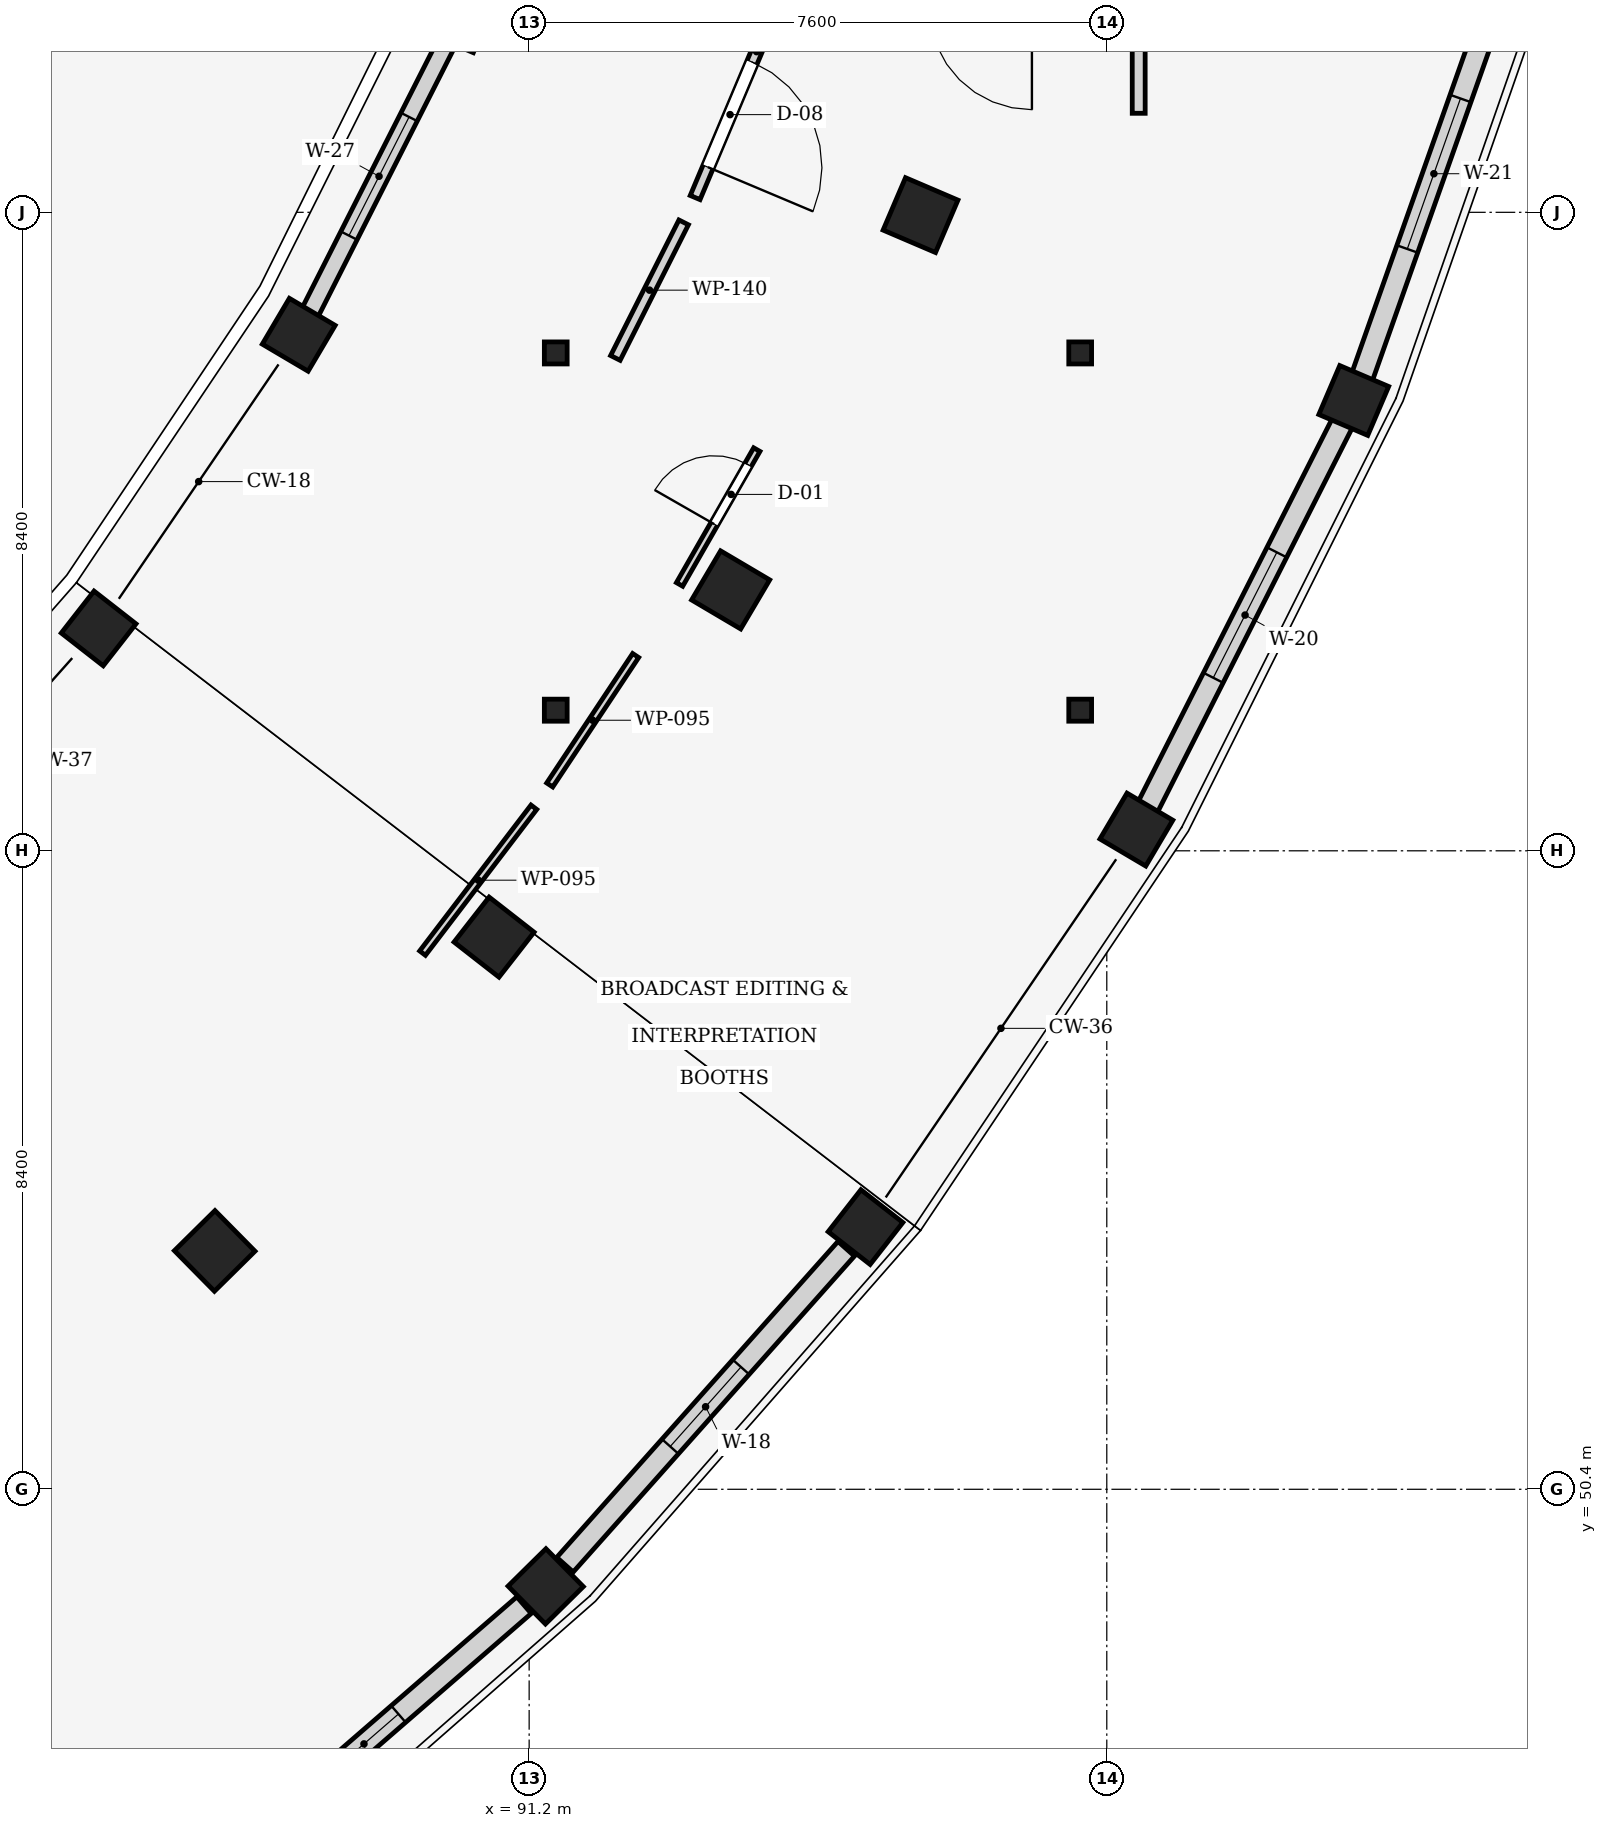
"""IFC4 building model, lengths in metres.
Left out: names, types, materials, properties, quantities, classifications, styles, units other than length and angle.
Written with IfcOpenShell. Run it as: python <this file> out.ifc"""

import sys

from ifc_helpers import new_model, si_unit, direction, frame, frame_2d, origin, origin_2d, place, context, subcontext, project, spatial, rectangle, circle, i_section, extrude, element, fill, save


model = new_model("IFC4")
c1 = context("Model", 3, precision=1e-05, world=origin(), true_north=direction((0.0, 1.0)))
c2 = subcontext(c1, "Body", "Model", "MODEL_VIEW")
j1 = project(units=[si_unit("LENGTHUNIT", "METRE"), si_unit("PLANEANGLEUNIT", "RADIAN")], contexts=[c1])
p1 = place(None, origin())
s1 = spatial("IfcSite", under=j1, at=p1, CompositionType="ELEMENT")
p2 = place(p1, origin())
s2 = spatial("IfcBuilding", under=s1, at=p2, CompositionType="ELEMENT")
p3 = place(p2, frame((0.0, 0.0, 5.1)))
s3 = spatial("IfcBuildingStorey", under=s2, at=p3, CompositionType="ELEMENT", Elevation=5.1)
p4 = place(p3, frame((87.063, 53.536, 0.0), z_axis=(0.0, 0.0, 1.0), x_axis=(0.70240155419, -0.711780904964, 0.0)))
e1 = element("IfcColumn", 1, at=p4, inside=s3, PredefinedType="COLUMN", context=c2, shape_type="SweptSolid", body=[
    extrude(circle(Radius=0.375, at=origin_2d()), origin(), (0.0, 0.0, 1.0), 4.05),
])
for number, where, z_axis, x_axis in (
    (2, (91.418, 49.123, 0.0), (0.0, 0.0, 1.0), (0.702, -0.712, 0.0)),
    (3, (85.536, 61.726, 0.0), (0.0, 0.0, 1.0), (0.788, -0.615, 0.0)),
):
    element("IfcColumn", number, at=place(p3, frame(where, z_axis=z_axis, x_axis=x_axis)), inside=s3, PredefinedType="COLUMN", context=c2, shape_type="SweptSolid", body=[
        extrude(rectangle(XDim=0.7, YDim=0.7, at=origin_2d()), origin(), (0.0, 0.0, 1.0), 4.05),
    ])
p5 = place(p3, frame((90.738, 57.664, 0.0), z_axis=(0.0, 0.0, 1.0), x_axis=(0.78822561199, -0.615386370179, 0.0)))
e4 = element("IfcColumn", 4, at=p5, inside=s3, PredefinedType="COLUMN", context=c2, shape_type="SweptSolid", body=[
    extrude(circle(Radius=0.375, at=origin_2d()), origin(), (0.0, 0.0, 1.0), 4.05),
])
for number, where, z_axis, x_axis in (
    (5, (95.626, 53.849, 0.0), (0.0, 0.0, 1.0), (0.788, -0.615, 0.0)),
    (6, (88.168, 65.589, 0.0), (0.0, 0.0, 1.0), (0.861, -0.509, 0.0)),
):
    element("IfcColumn", number, at=place(p3, frame(where, z_axis=z_axis, x_axis=x_axis)), inside=s3, PredefinedType="COLUMN", context=c2, shape_type="SweptSolid", body=[
        extrude(rectangle(XDim=0.7, YDim=0.7, at=origin_2d()), origin(), (0.0, 0.0, 1.0), 4.05),
    ])
p6 = place(p3, frame((93.851, 62.232, 0.0), z_axis=(0.0, 0.0, 1.0), x_axis=(0.861008442465, -0.508590662521, 0.0)))
e7 = element("IfcColumn", 7, at=p6, inside=s3, PredefinedType="COLUMN", context=c2, shape_type="SweptSolid", body=[
    extrude(circle(Radius=0.375, at=origin_2d()), origin(), (0.0, 0.0, 1.0), 4.05),
])
for number, where, z_axis, x_axis in (
    (8, (99.189, 59.079, 0.0), (0.0, 0.0, 1.0), (0.861, -0.509, 0.0)),
    (9, (90.281, 69.76, 0.0), (0.0, 0.0, 1.0), (0.919, -0.393, 0.0)),
):
    element("IfcColumn", number, at=place(p3, frame(where, z_axis=z_axis, x_axis=x_axis)), inside=s3, PredefinedType="COLUMN", context=c2, shape_type="SweptSolid", body=[
        extrude(rectangle(XDim=0.7, YDim=0.7, at=origin_2d()), origin(), (0.0, 0.0, 1.0), 4.05),
    ])
p7 = place(p3, frame((96.349, 67.163, 0.0), z_axis=(0.0, 0.0, 1.0), x_axis=(0.919410138581, -0.393300136124, 0.0)))
e10 = element("IfcColumn", 10, at=p7, inside=s3, PredefinedType="COLUMN", context=c2, shape_type="SweptSolid", body=[
    extrude(circle(Radius=0.375, at=origin_2d()), origin(), (0.0, 0.0, 1.0), 4.05),
])
p8 = place(p3, frame((102.049, 64.724, 0.0), z_axis=(0.0, 0.0, 1.0), x_axis=(0.919410138581, -0.393300136124, 0.0)))
e11 = element("IfcColumn", 11, at=p8, inside=s3, PredefinedType="COLUMN", context=c2, shape_type="SweptSolid", body=[
    extrude(rectangle(XDim=0.7, YDim=0.7, at=origin_2d()), origin(), (0.0, 0.0, 1.0), 4.05),
])
for number, where, z_axis, x_axis in (
    (12, (91.55, 60.65, 0.0), (0.0, 0.0, 1.0), (1.0, 0.0, 0.0)),
    (13, (98.45, 60.65, 0.0), (0.0, 0.0, 1.0), (1.0, 0.0, 0.0)),
    (14, (98.45, 65.35, 0.0), (0.0, 0.0, 1.0), (1.0, 0.0, 0.0)),
    (15, (91.55, 65.35, 0.0), (0.0, 0.0, 1.0), (1.0, 0.0, 0.0)),
):
    element("IfcColumn", number, at=place(p3, frame(where, z_axis=z_axis, x_axis=x_axis)), inside=s3, PredefinedType="COLUMN", context=c2, shape_type="SweptSolid", body=[
        extrude(i_section(OverallWidth=0.3, OverallDepth=0.29, WebThickness=0.009, FlangeThickness=0.014, at=origin_2d()), origin(), (0.0, 0.0, 1.0), 4.05),
    ])
p9 = place(p3, frame((91.133, 48.876, 0.0), z_axis=(0.0, 0.0, 1.0), x_axis=(-0.755658734158, -0.654965554431, 0.0)))
e16 = element("IfcWall", 16, at=p9, inside=s3, PredefinedType="STANDARD", context=c2, shape_type="SweptSolid", body=[
    extrude(rectangle(XDim=5.574, YDim=0.29, at=frame_2d((2.787, 0.0))), origin(), (0.0, 0.0, 1.0), 3.145),
])
p10 = place(p9, frame((2.187, 0.0, 0.85)))
e17 = element("IfcOpeningElement", 17, at=p10, cuts=e16, PredefinedType="OPENING", context=c2, shape_type="SweptSolid", body=[
    extrude(rectangle(XDim=1.2, YDim=1.65, at=frame_2d((0.6, 0.825))), frame((0.0, 0.155, 0.0), z_axis=(0.0, -1.0, 0.0), x_axis=(1.0, 0.0, 0.0)), (0.0, 0.0, 1.0), 0.31),
])
p11 = place(p3, frame((95.372, 53.564, 0.0), z_axis=(0.0, 0.0, 1.0), x_axis=(-0.664946320764, -0.746891150371, 0.0)))
e18 = element("IfcWall", 18, at=p11, inside=s3, PredefinedType="STANDARD", context=c2, shape_type="SweptSolid", body=[
    extrude(rectangle(XDim=5.565, YDim=0.29, at=frame_2d((2.783, 0.0))), origin(), (0.0, 0.0, 1.0), 3.145),
])
p12 = place(p11, frame((2.083, 0.0, 0.85)))
e19 = element("IfcOpeningElement", 19, at=p12, cuts=e18, PredefinedType="OPENING", context=c2, shape_type="SweptSolid", body=[
    extrude(rectangle(XDim=1.4, YDim=1.65, at=frame_2d((0.7, 0.825))), frame((0.0, 0.155, 0.0), z_axis=(0.0, -1.0, 0.0), x_axis=(1.0, 0.0, 0.0)), (0.0, 0.0, 1.0), 0.31),
])
p13 = place(p3, frame((101.905, 64.439, 0.0), z_axis=(0.0, 0.0, 1.0), x_axis=(-0.451927461329, -0.892054689857, 0.0)))
e20 = element("IfcWall", 20, at=p13, inside=s3, PredefinedType="STANDARD", context=c2, shape_type="SweptSolid", body=[
    extrude(rectangle(XDim=5.69, YDim=0.29, at=frame_2d((2.845, 0.0))), origin(), (0.0, 0.0, 1.0), 3.145),
])
p14 = place(p13, frame((1.92, 0.0, 0.85)))
e21 = element("IfcOpeningElement", 21, at=p14, cuts=e20, PredefinedType="OPENING", context=c2, shape_type="SweptSolid", body=[
    extrude(rectangle(XDim=1.85, YDim=1.65, at=frame_2d((0.925, 0.825))), frame((0.0, 0.155, 0.0), z_axis=(0.0, -1.0, 0.0), x_axis=(1.0, 0.0, 0.0)), (0.0, 0.0, 1.0), 0.31),
])
p15 = place(p3, frame((88.313, 65.874, 0.0), z_axis=(0.0, 0.0, 1.0), x_axis=(0.451901258468, 0.892067964112, 0.0)))
e22 = element("IfcWall", 22, at=p15, inside=s3, PredefinedType="STANDARD", context=c2, shape_type="SweptSolid", body=[
    extrude(rectangle(XDim=4.036, YDim=0.24, at=frame_2d((2.018, 0.0))), origin(), (0.0, 0.0, 1.0), 3.145),
])
p16 = place(p15, frame((1.143, 0.0, 0.85)))
e23 = element("IfcOpeningElement", 23, at=p16, cuts=e22, PredefinedType="OPENING", context=c2, shape_type="SweptSolid", body=[
    extrude(rectangle(XDim=1.75, YDim=1.85, at=frame_2d((0.875, 0.925))), frame((0.0, 0.13, 0.0), z_axis=(0.0, -1.0, 0.0), x_axis=(1.0, 0.0, 0.0)), (0.0, 0.0, 1.0), 0.26),
])
p17 = place(p3, frame((104.057, 70.406, 0.0), z_axis=(0.0, 0.0, 1.0), x_axis=(-0.333208301023, -0.942853237853, 0.0)))
e24 = element("IfcWall", 24, at=p17, inside=s3, PredefinedType="STANDARD", context=c2, shape_type="SweptSolid", body=[
    extrude(rectangle(XDim=5.724, YDim=0.29, at=frame_2d((2.862, 0.0))), origin(), (0.0, 0.0, 1.0), 3.145),
])
p18 = place(p17, frame((1.812, 0.0, 0.85)))
e25 = element("IfcOpeningElement", 25, at=p18, cuts=e24, PredefinedType="OPENING", context=c2, shape_type="SweptSolid", body=[
    extrude(rectangle(XDim=2.1, YDim=1.65, at=frame_2d((1.05, 0.825))), frame((0.0, 0.155, 0.0), z_axis=(0.0, -1.0, 0.0), x_axis=(1.0, 0.0, 0.0)), (0.0, 0.0, 1.0), 0.31),
])
p19 = place(p3, frame((91.471, 59.666, 0.0), z_axis=(0.0, 0.0, 1.0), x_axis=(0.553128107807, 0.833096210743, 0.0)))
e26 = element("IfcWall", 26, at=p19, inside=s3, PredefinedType="PARTITIONING", context=c2, shape_type="SweptSolid", body=[
    extrude(rectangle(XDim=2.044, YDim=0.095, at=frame_2d((1.022, 0.0))), origin(), (0.0, 0.0, 1.0), 3.68),
])
p20 = place(p3, frame((89.798, 57.454, 0.0), z_axis=(0.0, 0.0, 1.0), x_axis=(0.606597632587, 0.795009001295, 0.0)))
e27 = element("IfcWall", 27, at=p20, inside=s3, PredefinedType="PARTITIONING", context=c2, shape_type="SweptSolid", body=[
    extrude(rectangle(XDim=2.414, YDim=0.095, at=frame_2d((1.207, 0.0))), origin(), (0.0, 0.0, 1.0), 2.995),
])
p21 = place(p3, frame((93.179, 62.304, 0.0), z_axis=(0.0, 0.0, 1.0), x_axis=(0.497180364195, 0.867647212558, 0.0)))
e28 = element("IfcWall", 28, at=p21, inside=s3, PredefinedType="PARTITIONING", context=c2, shape_type="SweptSolid", body=[
    extrude(rectangle(XDim=2.044, YDim=0.095, at=frame_2d((1.022, 0.0))), origin(), (0.0, 0.0, 1.0), 2.995),
])
p22 = place(p21, frame((0.915, 0.0, 0.0)))
e29 = element("IfcOpeningElement", 29, at=p22, cuts=e28, PredefinedType="OPENING", context=c2, shape_type="SweptSolid", body=[
    extrude(rectangle(XDim=0.9, YDim=2.1, at=frame_2d((0.45, 1.05))), frame((0.0, 0.057, 0.0), z_axis=(0.0, -1.0, 0.0), x_axis=(1.0, 0.0, 0.0)), (0.0, 0.0, 1.0), 0.115),
])
p23 = place(p3, frame((99.22, 68.503, 0.0), z_axis=(0.0, 0.0, 1.0), x_axis=(-0.000171791786, 0.999999985244, 0.0)))
e30 = element("IfcWall", 30, at=p23, inside=s3, PredefinedType="PARTITIONING", context=c2, shape_type="SweptSolid", body=[
    extrude(rectangle(XDim=1.421, YDim=0.17, at=frame_2d((0.71, 0.0))), origin(), (0.0, 0.0, 1.0), 3.68),
])
p24 = place(p3, frame((94.302, 69.575, 0.0), z_axis=(0.0, 0.0, 1.0), x_axis=(-0.388172287911, -0.921586824395, 0.0)))
e31 = element("IfcWall", 31, at=p24, inside=s3, PredefinedType="PARTITIONING", context=c2, shape_type="SweptSolid", body=[
    extrude(rectangle(XDim=2.367, YDim=0.14, at=frame_2d((1.183, 0.0))), origin(), (0.0, 0.0, 1.0), 3.68),
])
p25 = place(p24, frame((0.433, 0.0, 0.0)))
e32 = element("IfcOpeningElement", 32, at=p25, cuts=e31, PredefinedType="OPENING", context=c2, shape_type="SweptSolid", body=[
    extrude(rectangle(XDim=1.5, YDim=2.1, at=frame_2d((0.75, 1.05))), frame((0.0, 0.08, 0.0), z_axis=(0.0, -1.0, 0.0), x_axis=(1.0, 0.0, 0.0)), (0.0, 0.0, 1.0), 0.16),
])
p26 = place(p3, frame((93.233, 67.068, 0.0), z_axis=(0.0, 0.0, 1.0), x_axis=(-0.449901200246, -0.89307833364, 0.0)))
e33 = element("IfcWall", 33, at=p26, inside=s3, PredefinedType="PARTITIONING", context=c2, shape_type="SweptSolid", body=[
    extrude(rectangle(XDim=1.997, YDim=0.14, at=frame_2d((0.999, 0.0))), origin(), (0.0, 0.0, 1.0), 3.68),
])
p27 = place(p10, origin())
e34 = element("IfcWindow", 34, at=p27, inside=s3, PartitioningType="SINGLE_PANEL", PredefinedType="WINDOW", context=c2, shape_type="SweptSolid", body=[
    extrude(rectangle(XDim=1.2, YDim=1.65, at=frame_2d((0.6, 0.825))), frame((0.0, 0.03, 0.0), z_axis=(0.0, -1.0, 0.0), x_axis=(1.0, 0.0, 0.0)), (0.0, 0.0, 1.0), 0.06),
])
fill(e17, e34)
p28 = place(p12, origin())
e35 = element("IfcWindow", 35, at=p28, inside=s3, PartitioningType="SINGLE_PANEL", PredefinedType="WINDOW", context=c2, shape_type="SweptSolid", body=[
    extrude(rectangle(XDim=1.4, YDim=1.65, at=frame_2d((0.7, 0.825))), frame((0.0, 0.03, 0.0), z_axis=(0.0, -1.0, 0.0), x_axis=(1.0, 0.0, 0.0)), (0.0, 0.0, 1.0), 0.06),
])
fill(e19, e35)
p29 = place(p14, origin())
e36 = element("IfcWindow", 36, at=p29, inside=s3, PartitioningType="SINGLE_PANEL", PredefinedType="WINDOW", context=c2, shape_type="SweptSolid", body=[
    extrude(rectangle(XDim=1.85, YDim=1.65, at=frame_2d((0.925, 0.825))), frame((0.0, 0.03, 0.0), z_axis=(0.0, -1.0, 0.0), x_axis=(1.0, 0.0, 0.0)), (0.0, 0.0, 1.0), 0.06),
])
fill(e21, e36)
p30 = place(p16, origin())
e37 = element("IfcWindow", 37, at=p30, inside=s3, PartitioningType="SINGLE_PANEL", PredefinedType="WINDOW", context=c2, shape_type="SweptSolid", body=[
    extrude(rectangle(XDim=1.75, YDim=1.85, at=frame_2d((0.875, 0.925))), frame((0.0, 0.03, 0.0), z_axis=(0.0, -1.0, 0.0), x_axis=(1.0, 0.0, 0.0)), (0.0, 0.0, 1.0), 0.06),
])
fill(e23, e37)
p31 = place(p18, origin())
e38 = element("IfcWindow", 38, at=p31, inside=s3, PartitioningType="SINGLE_PANEL", PredefinedType="WINDOW", context=c2, shape_type="SweptSolid", body=[
    extrude(rectangle(XDim=2.1, YDim=1.65, at=frame_2d((1.05, 0.825))), frame((0.0, 0.03, 0.0), z_axis=(0.0, -1.0, 0.0), x_axis=(1.0, 0.0, 0.0)), (0.0, 0.0, 1.0), 0.06),
])
fill(e25, e38)
p32 = place(p22, origin())
e39 = element("IfcDoor", 39, at=p32, inside=s3, OperationType="SINGLE_SWING_LEFT", PredefinedType="DOOR", context=c2, shape_type="SweptSolid", body=[
    extrude(rectangle(XDim=0.9, YDim=2.1, at=frame_2d((0.45, 1.05))), frame((0.0, 0.025, 0.0), z_axis=(0.0, -1.0, 0.0), x_axis=(1.0, 0.0, 0.0)), (0.0, 0.0, 1.0), 0.05),
])
fill(e29, e39)
p33 = place(p25, origin())
e40 = element("IfcDoor", 40, at=p33, inside=s3, OperationType="SINGLE_SWING_RIGHT", PredefinedType="DOOR", context=c2, shape_type="SweptSolid", body=[
    extrude(rectangle(XDim=1.5, YDim=2.1, at=frame_2d((0.75, 1.05))), frame((0.0, 0.025, 0.0), z_axis=(0.0, -1.0, 0.0), x_axis=(1.0, 0.0, 0.0)), (0.0, 0.0, 1.0), 0.05),
])
fill(e32, e40)
save(model, sys.argv[1])
